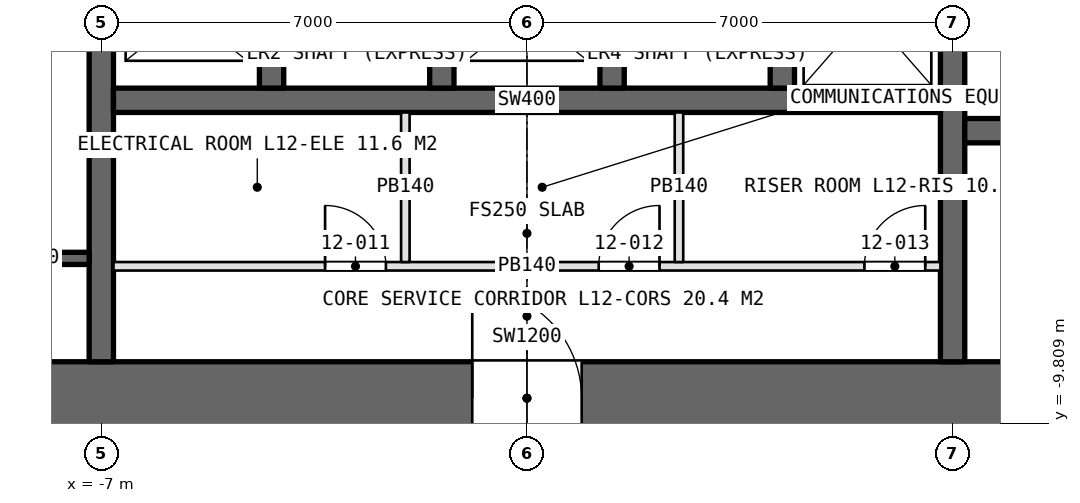
"""IFC4 building model, lengths in metres.
Left out: names, types, materials, properties, quantities, classifications, styles, units other than length and angle.
Written with IfcOpenShell. Run it as: python <this file> out.ifc"""

import sys

from ifc_helpers import new_model, si_unit, direction, frame, frame_2d, origin, place, context, subcontext, project, spatial, rectangle, extrude, element, fill, save


model = new_model("IFC4")
c1 = context("Model", 3, precision=1e-05, world=origin(), true_north=direction((0.0, 1.0)))
c2 = subcontext(c1, "Body", "Model", "MODEL_VIEW")
j1 = project(units=[si_unit("LENGTHUNIT", "METRE"), si_unit("PLANEANGLEUNIT", "RADIAN")], contexts=[c1])
p1 = place(None, origin())
s1 = spatial("IfcSite", under=j1, at=p1, CompositionType="ELEMENT")
p2 = place(p1, origin())
s2 = spatial("IfcBuilding", under=s1, at=p2, CompositionType="ELEMENT")
p3 = place(p2, frame((0.0, 0.0, 60.0)))
s3 = spatial("IfcBuildingStorey", under=s2, at=p3, CompositionType="ELEMENT", Elevation=60.0)
p4 = place(p3, frame((-14.0, -9.4, 0.0), z_axis=(0.0, 0.0, 1.0), x_axis=(1.0, 0.0, 0.0)))
e1 = element("IfcWall", 1, at=p4, inside=s3, PredefinedType="SHEAR", context=c2, shape_type="SweptSolid", body=[
    extrude(rectangle(XDim=28.0, YDim=1.2, at=frame_2d((14.0, 0.0))), origin(), (0.0, 0.0, 1.0), 5.0),
])
p5 = place(p4, frame((13.1, 0.0, 0.0)))
e2 = element("IfcOpeningElement", 2, at=p5, cuts=e1, PredefinedType="OPENING", context=c2, shape_type="SweptSolid", body=[
    extrude(rectangle(XDim=1.8, YDim=2.4, at=frame_2d((0.9, 1.2))), frame((0.0, 0.61, 0.0), z_axis=(0.0, -1.0, 0.0), x_axis=(1.0, 0.0, 0.0)), (0.0, 0.0, 1.0), 1.22),
])
p6 = place(p4, frame((22.9, 0.0, 0.0)))
e3 = element("IfcOpeningElement", 3, at=p6, cuts=e1, PredefinedType="OPENING", context=c2, shape_type="SweptSolid", body=[
    extrude(rectangle(XDim=2.2, YDim=2.7, at=frame_2d((1.1, 1.35))), frame((0.0, 0.61, 0.0), z_axis=(0.0, -1.0, 0.0), x_axis=(1.0, 0.0, 0.0)), (0.0, 0.0, 1.0), 1.22),
])
p7 = place(p3, frame((-7.0, -8.8, 0.0), z_axis=(0.0, 0.0, 1.0), x_axis=(0.0, 1.0, 0.0)))
e4 = element("IfcWall", 4, at=p7, inside=s3, PredefinedType="SHEAR", context=c2, shape_type="SweptSolid", body=[
    extrude(rectangle(XDim=17.6, YDim=0.4, at=frame_2d((8.8, 0.0))), origin(), (0.0, 0.0, 1.0), 5.0),
])
p8 = place(p7, frame((7.9, 0.0, 0.0)))
e5 = element("IfcOpeningElement", 5, at=p8, cuts=e4, PredefinedType="OPENING", context=c2, shape_type="SweptSolid", body=[
    extrude(rectangle(XDim=1.8, YDim=2.4, at=frame_2d((0.9, 1.2))), frame((0.0, 0.21, 0.0), z_axis=(0.0, -1.0, 0.0), x_axis=(1.0, 0.0, 0.0)), (0.0, 0.0, 1.0), 0.42),
])
p9 = place(p3, frame((7.0, -8.8, 0.0), z_axis=(0.0, 0.0, 1.0), x_axis=(0.0, 1.0, 0.0)))
e6 = element("IfcWall", 6, at=p9, inside=s3, PredefinedType="SHEAR", context=c2, shape_type="SweptSolid", body=[
    extrude(rectangle(XDim=17.6, YDim=0.4, at=frame_2d((8.8, 0.0))), origin(), (0.0, 0.0, 1.0), 5.0),
])
p10 = place(p9, frame((7.9, 0.0, 0.0)))
e7 = element("IfcOpeningElement", 7, at=p10, cuts=e6, PredefinedType="OPENING", context=c2, shape_type="SweptSolid", body=[
    extrude(rectangle(XDim=1.8, YDim=2.4, at=frame_2d((0.9, 1.2))), frame((0.0, 0.21, 0.0), z_axis=(0.0, -1.0, 0.0), x_axis=(1.0, 0.0, 0.0)), (0.0, 0.0, 1.0), 0.42),
])
p11 = place(p3, frame((-6.8, -4.5, 0.0), z_axis=(0.0, 0.0, 1.0), x_axis=(1.0, 0.0, 0.0)))
e8 = element("IfcWall", 8, at=p11, inside=s3, PredefinedType="SHEAR", context=c2, shape_type="SweptSolid", body=[
    extrude(rectangle(XDim=13.6, YDim=0.4, at=frame_2d((6.8, 0.0))), origin(), (0.0, 0.0, 1.0), 5.0),
])
p12 = place(p3, frame((7.2, -5.0, 0.0), z_axis=(0.0, 0.0, 1.0), x_axis=(1.0, 0.0, 0.0)))
e9 = element("IfcWall", 9, at=p12, inside=s3, PredefinedType="SHEAR", context=c2, shape_type="SweptSolid", body=[
    extrude(rectangle(XDim=5.6, YDim=0.4, at=frame_2d((2.8, 0.0))), origin(), (0.0, 0.0, 1.0), 5.0),
])
for number, where, z_axis, x_axis in (
    (10, (-4.2, -4.3, 0.0), (0.0, 0.0, 1.0), (0.0, 1.0, 0.0)),
    (11, (-1.4, -4.3, 0.0), (0.0, 0.0, 1.0), (0.0, 1.0, 0.0)),
    (12, (1.4, -4.3, 0.0), (0.0, 0.0, 1.0), (0.0, 1.0, 0.0)),
    (13, (4.2, -4.3, 0.0), (0.0, 0.0, 1.0), (0.0, 1.0, 0.0)),
):
    element("IfcWall", number, at=place(p3, frame(where, z_axis=z_axis, x_axis=x_axis)), inside=s3, PredefinedType="SHEAR", context=c2, shape_type="SweptSolid", body=[
        extrude(rectangle(XDim=2.5, YDim=0.4, at=frame_2d((1.25, 0.0))), origin(), (0.0, 0.0, 1.0), 5.0),
    ])
p13 = place(p3, frame((-6.8, -7.23, 0.0), z_axis=(0.0, 0.0, 1.0), x_axis=(1.0, 0.0, 0.0)))
e14 = element("IfcWall", 14, at=p13, inside=s3, PredefinedType="PARTITIONING", context=c2, shape_type="SweptSolid", body=[
    extrude(rectangle(XDim=13.6, YDim=0.14, at=frame_2d((6.8, 0.0))), origin(), (0.0, 0.0, 1.0), 4.75),
])
p14 = place(p13, frame((3.48, 0.0, 0.0)))
e15 = element("IfcOpeningElement", 15, at=p14, cuts=e14, PredefinedType="OPENING", context=c2, shape_type="SweptSolid", body=[
    extrude(rectangle(XDim=1.0, YDim=2.4, at=frame_2d((0.5, 1.2))), frame((0.0, 0.08, 0.0), z_axis=(0.0, -1.0, 0.0), x_axis=(1.0, 0.0, 0.0)), (0.0, 0.0, 1.0), 0.16),
])
p15 = place(p13, frame((7.98, 0.0, 0.0)))
e16 = element("IfcOpeningElement", 16, at=p15, cuts=e14, PredefinedType="OPENING", context=c2, shape_type="SweptSolid", body=[
    extrude(rectangle(XDim=1.0, YDim=2.4, at=frame_2d((0.5, 1.2))), frame((0.0, 0.08, 0.0), z_axis=(0.0, -1.0, 0.0), x_axis=(1.0, 0.0, 0.0)), (0.0, 0.0, 1.0), 0.16),
])
p16 = place(p13, frame((12.35, 0.0, 0.0)))
e17 = element("IfcOpeningElement", 17, at=p16, cuts=e14, PredefinedType="OPENING", context=c2, shape_type="SweptSolid", body=[
    extrude(rectangle(XDim=1.0, YDim=2.4, at=frame_2d((0.5, 1.2))), frame((0.0, 0.08, 0.0), z_axis=(0.0, -1.0, 0.0), x_axis=(1.0, 0.0, 0.0)), (0.0, 0.0, 1.0), 0.16),
])
for number, where, z_axis, x_axis in (
    (18, (-2.0, -4.7, 0.0), (0.0, 0.0, 1.0), (0.0, -1.0, 0.0)),
    (19, (2.5, -4.7, 0.0), (0.0, 0.0, 1.0), (0.0, -1.0, 0.0)),
):
    element("IfcWall", number, at=place(p3, frame(where, z_axis=z_axis, x_axis=x_axis)), inside=s3, PredefinedType="PARTITIONING", context=c2, shape_type="SweptSolid", body=[
        extrude(rectangle(XDim=2.46, YDim=0.14, at=frame_2d((1.23, 0.0))), origin(), (0.0, 0.0, 1.0), 4.75),
    ])
p17 = place(p3, frame((-9.15, -7.1, 0.0), z_axis=(0.0, 0.0, 1.0), x_axis=(1.0, 0.0, 0.0)))
e20 = element("IfcWall", 20, at=p17, inside=s3, PredefinedType="SOLIDWALL", context=c2, shape_type="SweptSolid", body=[
    extrude(rectangle(XDim=1.95, YDim=0.2, at=frame_2d((0.975, 0.0))), origin(), (0.0, 0.0, 1.0), 5.0),
])
p18 = place(p14, origin())
e21 = element("IfcDoor", 21, at=p18, inside=s3, OperationType="SINGLE_SWING_LEFT", PredefinedType="DOOR", context=c2, shape_type="SweptSolid", body=[
    extrude(rectangle(XDim=1.0, YDim=2.4, at=frame_2d((0.5, 1.2))), frame((0.0, 0.025, 0.0), z_axis=(0.0, -1.0, 0.0), x_axis=(1.0, 0.0, 0.0)), (0.0, 0.0, 1.0), 0.05),
])
fill(e15, e21)
p19 = place(p15, origin())
e22 = element("IfcDoor", 22, at=p19, inside=s3, OperationType="SINGLE_SWING_RIGHT", PredefinedType="DOOR", context=c2, shape_type="SweptSolid", body=[
    extrude(rectangle(XDim=1.0, YDim=2.4, at=frame_2d((0.5, 1.2))), frame((0.0, 0.025, 0.0), z_axis=(0.0, -1.0, 0.0), x_axis=(1.0, 0.0, 0.0)), (0.0, 0.0, 1.0), 0.05),
])
fill(e16, e22)
p20 = place(p16, origin())
e23 = element("IfcDoor", 23, at=p20, inside=s3, OperationType="SINGLE_SWING_RIGHT", PredefinedType="DOOR", context=c2, shape_type="SweptSolid", body=[
    extrude(rectangle(XDim=1.0, YDim=2.4, at=frame_2d((0.5, 1.2))), frame((0.0, 0.025, 0.0), z_axis=(0.0, -1.0, 0.0), x_axis=(1.0, 0.0, 0.0)), (0.0, 0.0, 1.0), 0.05),
])
fill(e17, e23)
p21 = place(p5, origin())
e24 = element("IfcDoor", 24, at=p21, inside=s3, OperationType="DOUBLE_DOOR_SINGLE_SWING", PredefinedType="DOOR", context=c2, shape_type="SweptSolid", body=[
    extrude(rectangle(XDim=1.8, YDim=2.4, at=frame_2d((0.9, 1.2))), frame((0.0, 0.025, 0.0), z_axis=(0.0, -1.0, 0.0), x_axis=(1.0, 0.0, 0.0)), (0.0, 0.0, 1.0), 0.05),
])
fill(e2, e24)
save(model, sys.argv[1])
